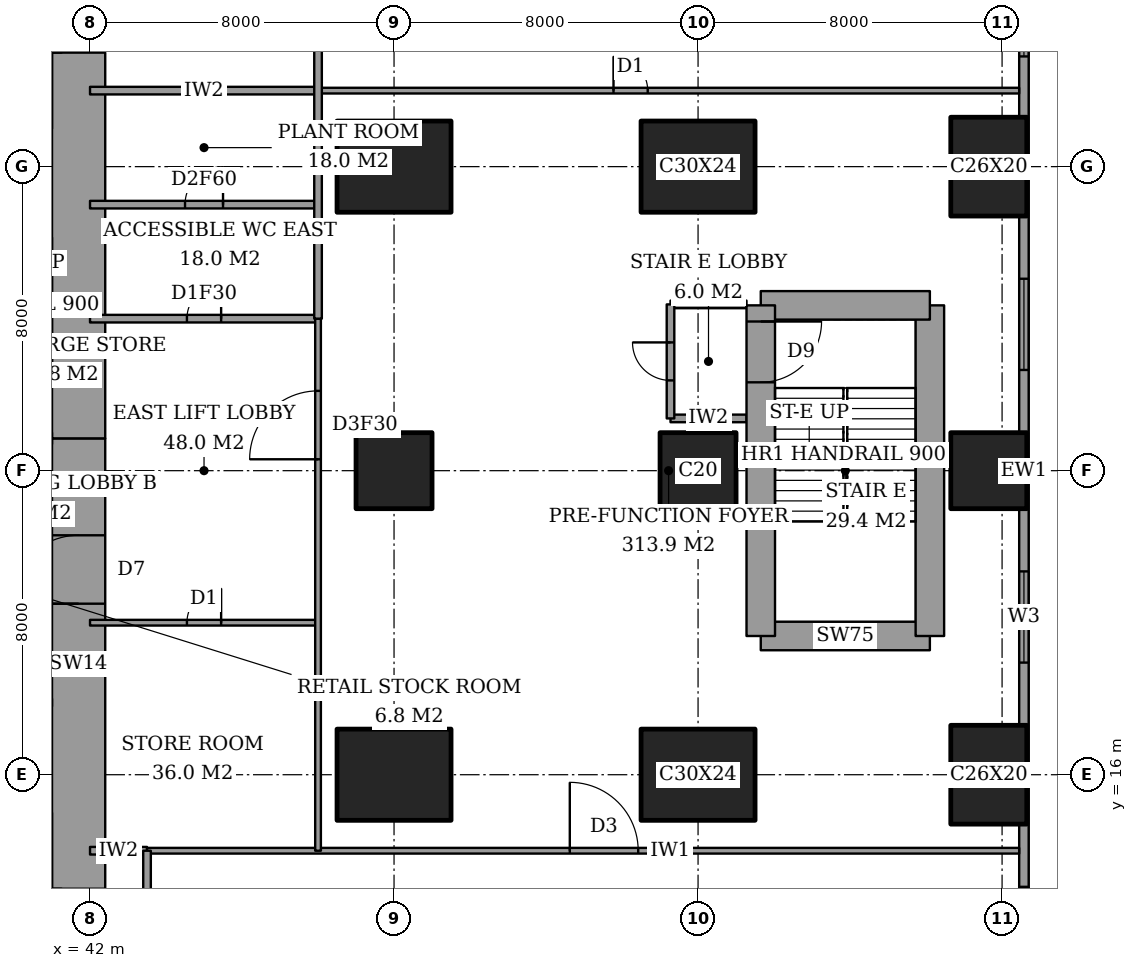
"""IFC4 building model, lengths in metres.
Left out: names, types, materials, properties, quantities, classifications, styles, units other than length and angle.
Written with IfcOpenShell. Run it as: python <this file> out.ifc"""

import sys

from ifc_helpers import new_model, si_unit, direction, frame, frame_2d, origin, origin_2d, place, context, subcontext, project, spatial, rectangle, extrude, element, fill, save


model = new_model("IFC4")
c1 = context("Model", 3, precision=1e-05, world=origin(), true_north=direction((0.0, 1.0)))
c2 = subcontext(c1, "Body", "Model", "MODEL_VIEW")
j1 = project(units=[si_unit("LENGTHUNIT", "METRE"), si_unit("PLANEANGLEUNIT", "RADIAN")], contexts=[c1])
p1 = place(None, origin())
s1 = spatial("IfcSite", under=j1, at=p1, CompositionType="ELEMENT")
p2 = place(p1, origin())
s2 = spatial("IfcBuilding", under=s1, at=p2, CompositionType="ELEMENT")
p3 = place(p2, frame((0.0, 0.0, 21.0)))
s3 = spatial("IfcBuildingStorey", under=s2, at=p3, CompositionType="ELEMENT", Elevation=21.0)
p4 = place(p3, frame((50.0, 16.0, 0.0), z_axis=(0.0, 0.0, 1.0), x_axis=(1.0, 0.0, 0.0)))
e1 = element("IfcColumn", 1, at=p4, inside=s3, PredefinedType="COLUMN", context=c2, shape_type="SweptSolid", body=[
    extrude(rectangle(XDim=3.0, YDim=2.4, at=origin_2d()), origin(), (0.0, 0.0, 1.0), 5.0),
])
p5 = place(p3, frame((50.0, 24.0, 0.0), z_axis=(0.0, 0.0, 1.0), x_axis=(1.0, 0.0, 0.0)))
e2 = element("IfcColumn", 2, at=p5, inside=s3, PredefinedType="COLUMN", context=c2, shape_type="SweptSolid", body=[
    extrude(rectangle(XDim=2.0, YDim=2.0, at=origin_2d()), origin(), (0.0, 0.0, 1.0), 5.0),
])
for number, where, z_axis, x_axis in (
    (3, (50.0, 32.0, 0.0), (0.0, 0.0, 1.0), (1.0, 0.0, 0.0)),
    (4, (58.0, 16.0, 0.0), (0.0, 0.0, 1.0), (1.0, 0.0, 0.0)),
):
    element("IfcColumn", number, at=place(p3, frame(where, z_axis=z_axis, x_axis=x_axis)), inside=s3, PredefinedType="COLUMN", context=c2, shape_type="SweptSolid", body=[
        extrude(rectangle(XDim=3.0, YDim=2.4, at=origin_2d()), origin(), (0.0, 0.0, 1.0), 5.0),
    ])
p6 = place(p3, frame((58.0, 24.0, 0.0), z_axis=(0.0, 0.0, 1.0), x_axis=(1.0, 0.0, 0.0)))
e5 = element("IfcColumn", 5, at=p6, inside=s3, PredefinedType="COLUMN", context=c2, shape_type="SweptSolid", body=[
    extrude(rectangle(XDim=2.0, YDim=2.0, at=origin_2d()), origin(), (0.0, 0.0, 1.0), 5.0),
])
p7 = place(p3, frame((58.0, 32.0, 0.0), z_axis=(0.0, 0.0, 1.0), x_axis=(1.0, 0.0, 0.0)))
e6 = element("IfcColumn", 6, at=p7, inside=s3, PredefinedType="COLUMN", context=c2, shape_type="SweptSolid", body=[
    extrude(rectangle(XDim=3.0, YDim=2.4, at=origin_2d()), origin(), (0.0, 0.0, 1.0), 5.0),
])
p8 = place(p3, frame((65.65, 16.0, 0.0), z_axis=(0.0, 0.0, 1.0), x_axis=(0.0, 1.0, 0.0)))
e7 = element("IfcColumn", 7, at=p8, inside=s3, PredefinedType="COLUMN", context=c2, shape_type="SweptSolid", body=[
    extrude(rectangle(XDim=2.6, YDim=2.0, at=origin_2d()), origin(), (0.0, 0.0, 1.0), 5.0),
])
p9 = place(p3, frame((65.65, 24.0, 0.0), z_axis=(0.0, 0.0, 1.0), x_axis=(1.0, 0.0, 0.0)))
e8 = element("IfcColumn", 8, at=p9, inside=s3, PredefinedType="COLUMN", context=c2, shape_type="SweptSolid", body=[
    extrude(rectangle(XDim=2.0, YDim=2.0, at=origin_2d()), origin(), (0.0, 0.0, 1.0), 5.0),
])
p10 = place(p3, frame((65.65, 32.0, 0.0), z_axis=(0.0, 0.0, 1.0), x_axis=(0.0, 1.0, 0.0)))
e9 = element("IfcColumn", 9, at=p10, inside=s3, PredefinedType="COLUMN", context=c2, shape_type="SweptSolid", body=[
    extrude(rectangle(XDim=2.6, YDim=2.0, at=origin_2d()), origin(), (0.0, 0.0, 1.0), 5.0),
])
p11 = place(p3, frame((41.7, 13.0, 0.0), z_axis=(0.0, 0.0, 1.0), x_axis=(0.0, 1.0, 0.0)))
e10 = element("IfcWall", 10, at=p11, inside=s3, PredefinedType="SHEAR", context=c2, shape_type="SweptSolid", body=[
    extrude(rectangle(XDim=11.85, YDim=1.4, at=frame_2d((5.925, 0.0))), origin(), (0.0, 0.0, 1.0), 5.0),
])
p12 = place(p11, frame((7.5, 0.0, 0.0)))
e11 = element("IfcOpeningElement", 11, at=p12, cuts=e10, PredefinedType="OPENING", context=c2, shape_type="SweptSolid", body=[
    extrude(rectangle(XDim=1.8, YDim=2.4, at=frame_2d((0.9, 1.2))), frame((0.0, 0.71, 0.0), z_axis=(0.0, -1.0, 0.0), x_axis=(1.0, 0.0, 0.0)), (0.0, 0.0, 1.0), 1.42),
])
p13 = place(p3, frame((41.7, 24.85, 0.0), z_axis=(0.0, 0.0, 1.0), x_axis=(0.0, 1.0, 0.0)))
e12 = element("IfcWall", 12, at=p13, inside=s3, PredefinedType="SHEAR", context=c2, shape_type="SweptSolid", body=[
    extrude(rectangle(XDim=10.15, YDim=1.4, at=frame_2d((5.075, 0.0))), origin(), (0.0, 0.0, 1.0), 5.0),
])
p14 = place(p3, frame((59.65, 19.65, 0.0), z_axis=(0.0, 0.0, 1.0), x_axis=(1.0, 0.0, 0.0)))
e13 = element("IfcWall", 13, at=p14, inside=s3, PredefinedType="SHEAR", context=c2, shape_type="SweptSolid", body=[
    extrude(rectangle(XDim=4.45, YDim=0.75, at=frame_2d((2.225, 0.0))), origin(), (0.0, 0.0, 1.0), 5.0),
])
p15 = place(p3, frame((64.1, 19.65, 0.0), z_axis=(0.0, 0.0, 1.0), x_axis=(0.0, 1.0, 0.0)))
e14 = element("IfcWall", 14, at=p15, inside=s3, PredefinedType="SHEAR", context=c2, shape_type="SweptSolid", body=[
    extrude(rectangle(XDim=8.7, YDim=0.75, at=frame_2d((4.35, 0.0))), origin(), (0.0, 0.0, 1.0), 5.0),
])
p16 = place(p3, frame((64.1, 28.35, 0.0), z_axis=(0.0, 0.0, 1.0), x_axis=(-1.0, 0.0, 0.0)))
e15 = element("IfcWall", 15, at=p16, inside=s3, PredefinedType="SHEAR", context=c2, shape_type="SweptSolid", body=[
    extrude(rectangle(XDim=4.45, YDim=0.75, at=frame_2d((2.225, 0.0))), origin(), (0.0, 0.0, 1.0), 5.0),
])
p17 = place(p3, frame((59.65, 28.35, 0.0), z_axis=(0.0, 0.0, 1.0), x_axis=(0.0, -1.0, 0.0)))
e16 = element("IfcWall", 16, at=p17, inside=s3, PredefinedType="SHEAR", context=c2, shape_type="SweptSolid", body=[
    extrude(rectangle(XDim=8.7, YDim=0.75, at=frame_2d((4.35, 0.0))), origin(), (0.0, 0.0, 1.0), 5.0),
])
p18 = place(p17, frame((0.425, 0.0, 0.0)))
e17 = element("IfcOpeningElement", 17, at=p18, cuts=e16, PredefinedType="OPENING", context=c2, shape_type="SweptSolid", body=[
    extrude(rectangle(XDim=1.6, YDim=2.1, at=frame_2d((0.8, 1.05))), frame((0.0, 0.385, 0.0), z_axis=(0.0, -1.0, 0.0), x_axis=(1.0, 0.0, 0.0)), (0.0, 0.0, 1.0), 0.77),
])
p19 = place(p3, frame((66.575, 3.175, 0.0), z_axis=(0.0, 0.0, 1.0), x_axis=(0.0, 1.0, 0.0)))
e18 = element("IfcWall", 18, at=p19, inside=s3, PredefinedType="SOLIDWALL", context=c2, shape_type="SweptSolid", body=[
    extrude(rectangle(XDim=41.65, YDim=0.25, at=frame_2d((20.825, 0.0))), origin(), (0.0, 0.0, 1.0), 5.0),
])
p20 = place(p19, frame((7.475, 0.0, 0.6)))
e19 = element("IfcOpeningElement", 19, at=p20, cuts=e18, PredefinedType="OPENING", context=c2, shape_type="SweptSolid", body=[
    extrude(rectangle(XDim=2.4, YDim=3.0, at=frame_2d((1.2, 1.5))), frame((0.0, 0.135, 0.0), z_axis=(0.0, -1.0, 0.0), x_axis=(1.0, 0.0, 0.0)), (0.0, 0.0, 1.0), 0.27),
])
p21 = place(p19, frame((15.775, 0.0, 0.6)))
e20 = element("IfcOpeningElement", 20, at=p21, cuts=e18, PredefinedType="OPENING", context=c2, shape_type="SweptSolid", body=[
    extrude(rectangle(XDim=2.4, YDim=3.0, at=frame_2d((1.2, 1.5))), frame((0.0, 0.135, 0.0), z_axis=(0.0, -1.0, 0.0), x_axis=(1.0, 0.0, 0.0)), (0.0, 0.0, 1.0), 0.27),
])
p22 = place(p19, frame((23.475, 0.0, 0.6)))
e21 = element("IfcOpeningElement", 21, at=p22, cuts=e18, PredefinedType="OPENING", context=c2, shape_type="SweptSolid", body=[
    extrude(rectangle(XDim=2.4, YDim=3.0, at=frame_2d((1.2, 1.5))), frame((0.0, 0.135, 0.0), z_axis=(0.0, -1.0, 0.0), x_axis=(1.0, 0.0, 0.0)), (0.0, 0.0, 1.0), 0.27),
])
p23 = place(p19, frame((31.725, 0.0, 0.6)))
e22 = element("IfcOpeningElement", 22, at=p23, cuts=e18, PredefinedType="OPENING", context=c2, shape_type="SweptSolid", body=[
    extrude(rectangle(XDim=2.4, YDim=3.0, at=frame_2d((1.2, 1.5))), frame((0.0, 0.135, 0.0), z_axis=(0.0, -1.0, 0.0), x_axis=(1.0, 0.0, 0.0)), (0.0, 0.0, 1.0), 0.27),
])
p24 = place(p3, frame((42.0, 14.0, 0.0), z_axis=(0.0, 0.0, 1.0), x_axis=(1.0, 0.0, 0.0)))
e23 = element("IfcWall", 23, at=p24, inside=s3, PredefinedType="PARTITIONING", context=c2, shape_type="SweptSolid", body=[
    extrude(rectangle(XDim=1.5, YDim=0.2, at=frame_2d((0.75, 0.0))), origin(), (0.0, 0.0, 1.0), 4.65),
])
p25 = place(p3, frame((43.5, 14.0, 0.0), z_axis=(0.0, 0.0, 1.0), x_axis=(1.0, 0.0, 0.0)))
e24 = element("IfcWall", 24, at=p25, inside=s3, PredefinedType="PARTITIONING", context=c2, shape_type="SweptSolid", body=[
    extrude(rectangle(XDim=22.95, YDim=0.15, at=frame_2d((11.475, 0.0))), origin(), (0.0, 0.0, 1.0), 4.65),
])
p26 = place(p25, frame((11.125, 0.0, 0.0)))
e25 = element("IfcOpeningElement", 25, at=p26, cuts=e24, PredefinedType="OPENING", context=c2, shape_type="SweptSolid", body=[
    extrude(rectangle(XDim=1.8, YDim=2.1, at=frame_2d((0.9, 1.05))), frame((0.0, 0.085, 0.0), z_axis=(0.0, -1.0, 0.0), x_axis=(1.0, 0.0, 0.0)), (0.0, 0.0, 1.0), 0.17),
])
p27 = place(p3, frame((42.0, 20.0, 0.0), z_axis=(0.0, 0.0, 1.0), x_axis=(1.0, 0.0, 0.0)))
e26 = element("IfcWall", 26, at=p27, inside=s3, PredefinedType="PARTITIONING", context=c2, shape_type="SweptSolid", body=[
    extrude(rectangle(XDim=6.0, YDim=0.15, at=frame_2d((3.0, 0.0))), origin(), (0.0, 0.0, 1.0), 4.65),
])
p28 = place(p27, frame((2.55, 0.0, 0.0)))
e27 = element("IfcOpeningElement", 27, at=p28, cuts=e26, PredefinedType="OPENING", context=c2, shape_type="SweptSolid", body=[
    extrude(rectangle(XDim=0.9, YDim=2.1, at=frame_2d((0.45, 1.05))), frame((0.0, 0.085, 0.0), z_axis=(0.0, -1.0, 0.0), x_axis=(1.0, 0.0, 0.0)), (0.0, 0.0, 1.0), 0.17),
])
p29 = place(p3, frame((57.275, 25.375, 0.0), z_axis=(0.0, 0.0, 1.0), x_axis=(1.0, 0.0, 0.0)))
e28 = element("IfcWall", 28, at=p29, inside=s3, PredefinedType="PARTITIONING", context=c2, shape_type="SweptSolid", body=[
    extrude(rectangle(XDim=2.0, YDim=0.2, at=frame_2d((1.0, 0.0))), origin(), (0.0, 0.0, 1.0), 4.65),
])
p30 = place(p3, frame((42.0, 28.0, 0.0), z_axis=(0.0, 0.0, 1.0), x_axis=(1.0, 0.0, 0.0)))
e29 = element("IfcWall", 29, at=p30, inside=s3, PredefinedType="PARTITIONING", context=c2, shape_type="SweptSolid", body=[
    extrude(rectangle(XDim=6.0, YDim=0.2, at=frame_2d((3.0, 0.0))), origin(), (0.0, 0.0, 1.0), 4.65),
])
p31 = place(p30, frame((2.55, 0.0, 0.0)))
e30 = element("IfcOpeningElement", 30, at=p31, cuts=e29, PredefinedType="OPENING", context=c2, shape_type="SweptSolid", body=[
    extrude(rectangle(XDim=0.9, YDim=2.1, at=frame_2d((0.45, 1.05))), frame((0.0, 0.11, 0.0), z_axis=(0.0, -1.0, 0.0), x_axis=(1.0, 0.0, 0.0)), (0.0, 0.0, 1.0), 0.22),
])
p32 = place(p3, frame((57.275, 28.375, 0.0), z_axis=(0.0, 0.0, 1.0), x_axis=(1.0, 0.0, 0.0)))
e31 = element("IfcWall", 31, at=p32, inside=s3, PredefinedType="PARTITIONING", context=c2, shape_type="SweptSolid", body=[
    extrude(rectangle(XDim=2.0, YDim=0.2, at=frame_2d((1.0, 0.0))), origin(), (0.0, 0.0, 1.0), 4.65),
])
p33 = place(p3, frame((42.0, 31.0, 0.0), z_axis=(0.0, 0.0, 1.0), x_axis=(1.0, 0.0, 0.0)))
e32 = element("IfcWall", 32, at=p33, inside=s3, PredefinedType="PARTITIONING", context=c2, shape_type="SweptSolid", body=[
    extrude(rectangle(XDim=6.0, YDim=0.2, at=frame_2d((3.0, 0.0))), origin(), (0.0, 0.0, 1.0), 4.65),
])
p34 = place(p33, frame((2.5, 0.0, 0.0)))
e33 = element("IfcOpeningElement", 33, at=p34, cuts=e32, PredefinedType="OPENING", context=c2, shape_type="SweptSolid", body=[
    extrude(rectangle(XDim=1.0, YDim=2.1, at=frame_2d((0.5, 1.05))), frame((0.0, 0.11, 0.0), z_axis=(0.0, -1.0, 0.0), x_axis=(1.0, 0.0, 0.0)), (0.0, 0.0, 1.0), 0.22),
])
p35 = place(p3, frame((42.0, 34.0, 0.0), z_axis=(0.0, 0.0, 1.0), x_axis=(1.0, 0.0, 0.0)))
e34 = element("IfcWall", 34, at=p35, inside=s3, PredefinedType="PARTITIONING", context=c2, shape_type="SweptSolid", body=[
    extrude(rectangle(XDim=6.0, YDim=0.2, at=frame_2d((3.0, 0.0))), origin(), (0.0, 0.0, 1.0), 4.65),
])
p36 = place(p3, frame((48.0, 34.0, 0.0), z_axis=(0.0, 0.0, 1.0), x_axis=(1.0, 0.0, 0.0)))
e35 = element("IfcWall", 35, at=p36, inside=s3, PredefinedType="PARTITIONING", context=c2, shape_type="SweptSolid", body=[
    extrude(rectangle(XDim=18.45, YDim=0.15, at=frame_2d((9.225, 0.0))), origin(), (0.0, 0.0, 1.0), 4.65),
])
p37 = place(p36, frame((7.775, 0.0, 0.0)))
e36 = element("IfcOpeningElement", 36, at=p37, cuts=e35, PredefinedType="OPENING", context=c2, shape_type="SweptSolid", body=[
    extrude(rectangle(XDim=0.9, YDim=2.1, at=frame_2d((0.45, 1.05))), frame((0.0, 0.085, 0.0), z_axis=(0.0, -1.0, 0.0), x_axis=(1.0, 0.0, 0.0)), (0.0, 0.0, 1.0), 0.17),
])
p38 = place(p3, frame((41.15, -0.45, 0.0), z_axis=(0.0, 0.0, 1.0), x_axis=(0.0, 1.0, 0.0)))
e37 = element("IfcWall", 37, at=p38, inside=s3, PredefinedType="PARTITIONING", context=c2, shape_type="SweptSolid", body=[
    extrude(rectangle(XDim=13.45, YDim=0.2, at=frame_2d((6.725, 0.0))), origin(), (0.0, 0.0, 1.0), 4.65),
])
p39 = place(p3, frame((43.5, -0.45, 0.0), z_axis=(0.0, 0.0, 1.0), x_axis=(0.0, 1.0, 0.0)))
e38 = element("IfcWall", 38, at=p39, inside=s3, PredefinedType="PARTITIONING", context=c2, shape_type="SweptSolid", body=[
    extrude(rectangle(XDim=14.45, YDim=0.2, at=frame_2d((7.225, 0.0))), origin(), (0.0, 0.0, 1.0), 4.65),
])
p40 = place(p3, frame((48.0, 28.0, 0.0), z_axis=(0.0, 0.0, 1.0), x_axis=(0.0, 1.0, 0.0)))
e39 = element("IfcWall", 39, at=p40, inside=s3, PredefinedType="PARTITIONING", context=c2, shape_type="SweptSolid", body=[
    extrude(rectangle(XDim=20.561, YDim=0.2, at=frame_2d((10.281, 0.0))), origin(), (0.0, 0.0, 1.0), 4.65),
])
p41 = place(p3, frame((48.0, 14.0, 0.0), z_axis=(0.0, 0.0, 1.0), x_axis=(0.0, 1.0, 0.0)))
e40 = element("IfcWall", 40, at=p41, inside=s3, PredefinedType="PARTITIONING", context=c2, shape_type="SweptSolid", body=[
    extrude(rectangle(XDim=14.0, YDim=0.15, at=frame_2d((7.0, 0.0))), origin(), (0.0, 0.0, 1.0), 4.65),
])
p42 = place(p41, frame((10.3, 0.0, 0.0)))
e41 = element("IfcOpeningElement", 41, at=p42, cuts=e40, PredefinedType="OPENING", context=c2, shape_type="SweptSolid", body=[
    extrude(rectangle(XDim=1.8, YDim=2.1, at=frame_2d((0.9, 1.05))), frame((0.0, 0.085, 0.0), z_axis=(0.0, -1.0, 0.0), x_axis=(1.0, 0.0, 0.0)), (0.0, 0.0, 1.0), 0.17),
])
p43 = place(p3, frame((57.275, 25.375, 0.0), z_axis=(0.0, 0.0, 1.0), x_axis=(0.0, 1.0, 0.0)))
e42 = element("IfcWall", 42, at=p43, inside=s3, PredefinedType="PARTITIONING", context=c2, shape_type="SweptSolid", body=[
    extrude(rectangle(XDim=3.0, YDim=0.2, at=frame_2d((1.5, 0.0))), origin(), (0.0, 0.0, 1.0), 4.65),
])
p44 = place(p43, frame((1.0, 0.0, 0.0)))
e43 = element("IfcOpeningElement", 43, at=p44, cuts=e42, PredefinedType="OPENING", context=c2, shape_type="SweptSolid", body=[
    extrude(rectangle(XDim=1.0, YDim=2.1, at=frame_2d((0.5, 1.05))), frame((0.0, 0.11, 0.0), z_axis=(0.0, -1.0, 0.0), x_axis=(1.0, 0.0, 0.0)), (0.0, 0.0, 1.0), 0.22),
])
p45 = place(p3, frame((28.3, 17.9, 0.0), z_axis=(0.0, 0.0, 1.0), x_axis=(1.0, 0.0, 0.0)))
e44 = element("IfcWall", 44, at=p45, inside=s3, PredefinedType="PARTITIONING", context=c2, shape_type="SweptSolid", body=[
    extrude(rectangle(XDim=12.7, YDim=0.2, at=frame_2d((6.35, 0.0))), origin(), (0.0, 0.0, 1.0), 5.0),
])
p46 = place(p45, frame((0.95, 0.0, 0.0)))
e45 = element("IfcOpeningElement", 45, at=p46, cuts=e44, PredefinedType="OPENING", context=c2, shape_type="SweptSolid", body=[
    extrude(rectangle(XDim=1.1, YDim=2.1, at=frame_2d((0.55, 1.05))), frame((0.0, 0.11, 0.0), z_axis=(0.0, -1.0, 0.0), x_axis=(1.0, 0.0, 0.0)), (0.0, 0.0, 1.0), 0.22),
])
p47 = place(p45, frame((4.15, 0.0, 0.0)))
e46 = element("IfcOpeningElement", 46, at=p47, cuts=e44, PredefinedType="OPENING", context=c2, shape_type="SweptSolid", body=[
    extrude(rectangle(XDim=1.1, YDim=2.1, at=frame_2d((0.55, 1.05))), frame((0.0, 0.11, 0.0), z_axis=(0.0, -1.0, 0.0), x_axis=(1.0, 0.0, 0.0)), (0.0, 0.0, 1.0), 0.22),
])
p48 = place(p45, frame((7.35, 0.0, 0.0)))
e47 = element("IfcOpeningElement", 47, at=p48, cuts=e44, PredefinedType="OPENING", context=c2, shape_type="SweptSolid", body=[
    extrude(rectangle(XDim=1.1, YDim=2.1, at=frame_2d((0.55, 1.05))), frame((0.0, 0.11, 0.0), z_axis=(0.0, -1.0, 0.0), x_axis=(1.0, 0.0, 0.0)), (0.0, 0.0, 1.0), 0.22),
])
p49 = place(p45, frame((10.6, 0.0, 0.0)))
e48 = element("IfcOpeningElement", 48, at=p49, cuts=e44, PredefinedType="OPENING", context=c2, shape_type="SweptSolid", body=[
    extrude(rectangle(XDim=1.2, YDim=2.1, at=frame_2d((0.6, 1.05))), frame((0.0, 0.11, 0.0), z_axis=(0.0, -1.0, 0.0), x_axis=(1.0, 0.0, 0.0)), (0.0, 0.0, 1.0), 0.22),
])
p50 = place(p20, origin())
e49 = element("IfcWindow", 49, at=p50, inside=s3, PartitioningType="SINGLE_PANEL", PredefinedType="WINDOW", context=c2, shape_type="SweptSolid", body=[
    extrude(rectangle(XDim=2.4, YDim=3.0, at=frame_2d((1.2, 1.5))), frame((0.0, 0.03, 0.0), z_axis=(0.0, -1.0, 0.0), x_axis=(1.0, 0.0, 0.0)), (0.0, 0.0, 1.0), 0.06),
])
fill(e19, e49)
p51 = place(p21, origin())
e50 = element("IfcWindow", 50, at=p51, inside=s3, PartitioningType="SINGLE_PANEL", PredefinedType="WINDOW", context=c2, shape_type="SweptSolid", body=[
    extrude(rectangle(XDim=2.4, YDim=3.0, at=frame_2d((1.2, 1.5))), frame((0.0, 0.03, 0.0), z_axis=(0.0, -1.0, 0.0), x_axis=(1.0, 0.0, 0.0)), (0.0, 0.0, 1.0), 0.06),
])
fill(e20, e50)
p52 = place(p22, origin())
e51 = element("IfcWindow", 51, at=p52, inside=s3, PartitioningType="SINGLE_PANEL", PredefinedType="WINDOW", context=c2, shape_type="SweptSolid", body=[
    extrude(rectangle(XDim=2.4, YDim=3.0, at=frame_2d((1.2, 1.5))), frame((0.0, 0.03, 0.0), z_axis=(0.0, -1.0, 0.0), x_axis=(1.0, 0.0, 0.0)), (0.0, 0.0, 1.0), 0.06),
])
fill(e21, e51)
p53 = place(p23, origin())
e52 = element("IfcWindow", 52, at=p53, inside=s3, PartitioningType="SINGLE_PANEL", PredefinedType="WINDOW", context=c2, shape_type="SweptSolid", body=[
    extrude(rectangle(XDim=2.4, YDim=3.0, at=frame_2d((1.2, 1.5))), frame((0.0, 0.03, 0.0), z_axis=(0.0, -1.0, 0.0), x_axis=(1.0, 0.0, 0.0)), (0.0, 0.0, 1.0), 0.06),
])
fill(e22, e52)
p54 = place(p26, origin())
e53 = element("IfcDoor", 53, at=p54, inside=s3, OperationType="DOUBLE_DOOR_DOUBLE_SWING", PredefinedType="DOOR", context=c2, shape_type="SweptSolid", body=[
    extrude(rectangle(XDim=1.8, YDim=2.1, at=frame_2d((0.9, 1.05))), frame((0.0, 0.025, 0.0), z_axis=(0.0, -1.0, 0.0), x_axis=(1.0, 0.0, 0.0)), (0.0, 0.0, 1.0), 0.05),
])
fill(e25, e53)
p55 = place(p37, origin())
e54 = element("IfcDoor", 54, at=p55, inside=s3, OperationType="SINGLE_SWING_RIGHT", PredefinedType="DOOR", context=c2, shape_type="SweptSolid", body=[
    extrude(rectangle(XDim=0.9, YDim=2.1, at=frame_2d((0.45, 1.05))), frame((0.0, 0.025, 0.0), z_axis=(0.0, -1.0, 0.0), x_axis=(1.0, 0.0, 0.0)), (0.0, 0.0, 1.0), 0.05),
])
fill(e36, e54)
p56 = place(p42, origin())
e55 = element("IfcDoor", 55, at=p56, inside=s3, OperationType="DOUBLE_DOOR_DOUBLE_SWING", PredefinedType="DOOR", context=c2, shape_type="SweptSolid", body=[
    extrude(rectangle(XDim=1.8, YDim=2.1, at=frame_2d((0.9, 1.05))), frame((0.0, 0.025, 0.0), z_axis=(0.0, -1.0, 0.0), x_axis=(1.0, 0.0, 0.0)), (0.0, 0.0, 1.0), 0.05),
])
fill(e41, e55)
p57 = place(p31, origin())
e56 = element("IfcDoor", 56, at=p57, inside=s3, OperationType="SINGLE_SWING_LEFT", PredefinedType="DOOR", context=c2, shape_type="SweptSolid", body=[
    extrude(rectangle(XDim=0.9, YDim=2.1, at=frame_2d((0.45, 1.05))), frame((0.0, 0.025, 0.0), z_axis=(0.0, -1.0, 0.0), x_axis=(1.0, 0.0, 0.0)), (0.0, 0.0, 1.0), 0.05),
])
fill(e30, e56)
p58 = place(p28, origin())
e57 = element("IfcDoor", 57, at=p58, inside=s3, OperationType="SINGLE_SWING_LEFT", PredefinedType="DOOR", context=c2, shape_type="SweptSolid", body=[
    extrude(rectangle(XDim=0.9, YDim=2.1, at=frame_2d((0.45, 1.05))), frame((0.0, 0.025, 0.0), z_axis=(0.0, -1.0, 0.0), x_axis=(1.0, 0.0, 0.0)), (0.0, 0.0, 1.0), 0.05),
])
fill(e27, e57)
p59 = place(p34, origin())
e58 = element("IfcDoor", 58, at=p59, inside=s3, OperationType="SINGLE_SWING_LEFT", PredefinedType="DOOR", context=c2, shape_type="SweptSolid", body=[
    extrude(rectangle(XDim=1.0, YDim=2.1, at=frame_2d((0.5, 1.05))), frame((0.0, 0.025, 0.0), z_axis=(0.0, -1.0, 0.0), x_axis=(1.0, 0.0, 0.0)), (0.0, 0.0, 1.0), 0.05),
])
fill(e33, e58)
p60 = place(p44, origin())
e59 = element("IfcDoor", 59, at=p60, inside=s3, OperationType="SINGLE_SWING_LEFT", PredefinedType="DOOR", context=c2, shape_type="SweptSolid", body=[
    extrude(rectangle(XDim=1.0, YDim=2.1, at=frame_2d((0.5, 1.05))), frame((0.0, 0.025, 0.0), z_axis=(0.0, -1.0, 0.0), x_axis=(1.0, 0.0, 0.0)), (0.0, 0.0, 1.0), 0.05),
])
fill(e43, e59)
p61 = place(p12, origin())
e60 = element("IfcDoor", 60, at=p61, inside=s3, OperationType="DOUBLE_DOOR_DOUBLE_SWING", PredefinedType="DOOR", context=c2, shape_type="SweptSolid", body=[
    extrude(rectangle(XDim=1.8, YDim=2.4, at=frame_2d((0.9, 1.2))), frame((0.0, 0.025, 0.0), z_axis=(0.0, -1.0, 0.0), x_axis=(1.0, 0.0, 0.0)), (0.0, 0.0, 1.0), 0.05),
])
fill(e11, e60)
p62 = place(p18, origin())
e61 = element("IfcDoor", 61, at=p62, inside=s3, OperationType="DOUBLE_DOOR_SINGLE_SWING", PredefinedType="DOOR", context=c2, shape_type="SweptSolid", body=[
    extrude(rectangle(XDim=1.6, YDim=2.1, at=frame_2d((0.8, 1.05))), frame((0.0, 0.025, 0.0), z_axis=(0.0, -1.0, 0.0), x_axis=(1.0, 0.0, 0.0)), (0.0, 0.0, 1.0), 0.05),
])
fill(e17, e61)
save(model, sys.argv[1])
